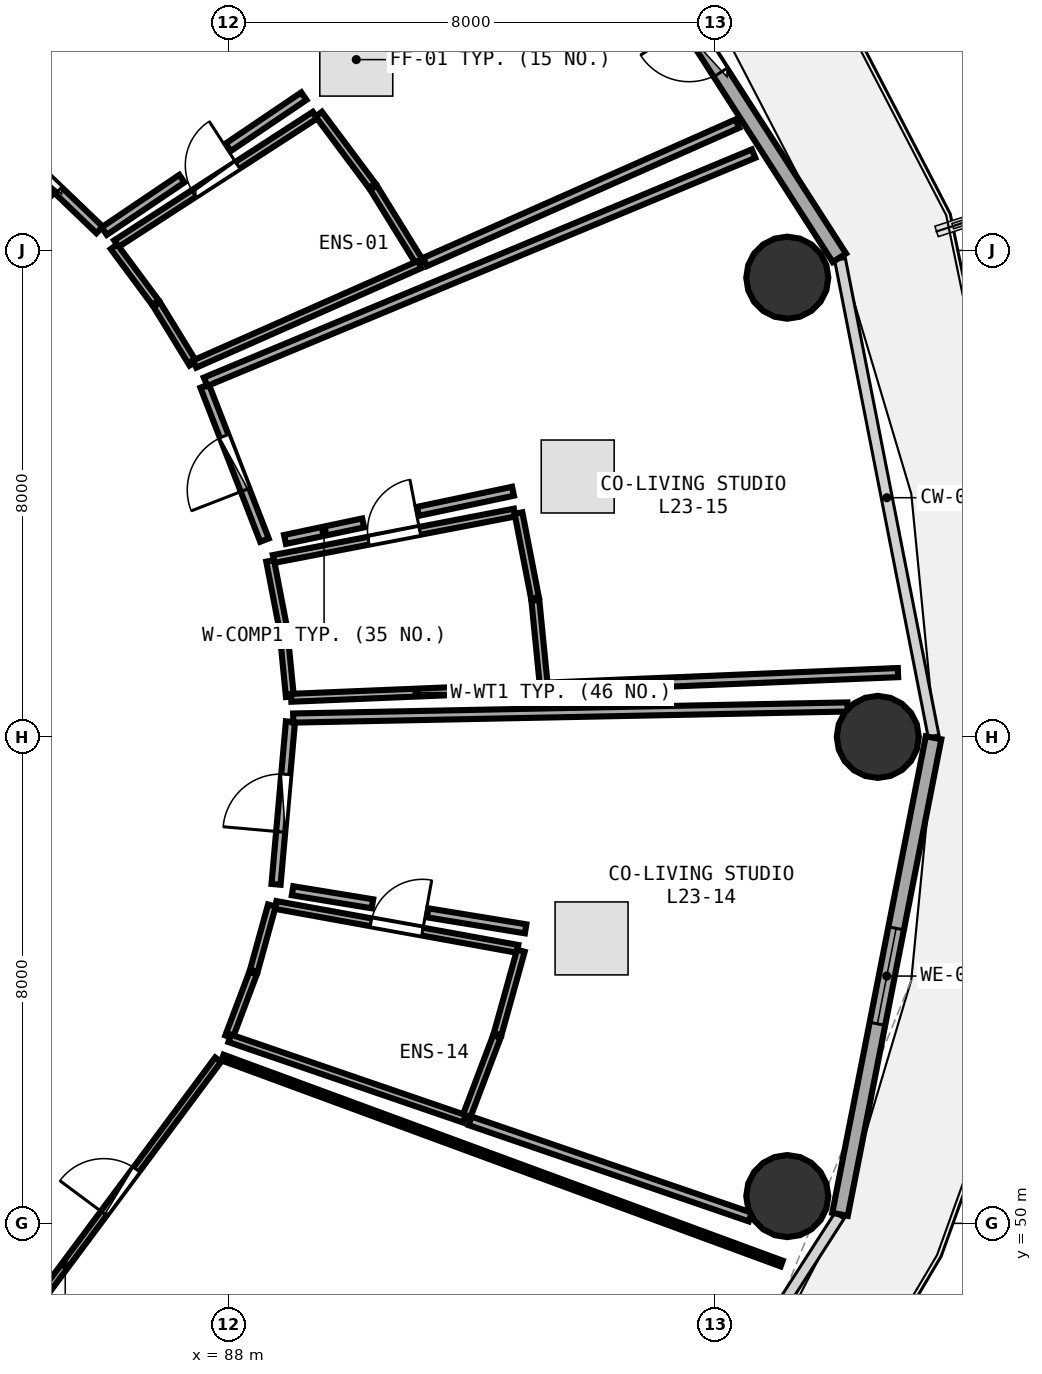
"""IFC4 building model, lengths in metres.
Left out: names, types, materials, properties, quantities, classifications, styles, units other than length and angle.
Written with IfcOpenShell. Run it as: python <this file> out.ifc"""

import sys

from ifc_helpers import new_model, si_unit, direction, frame, frame_2d, origin, origin_2d, place, context, subcontext, project, spatial, rectangle, circle, extrude, element, fill, save


model = new_model("IFC4")
c1 = context("Model", 3, precision=1e-05, world=origin(), true_north=direction((0.0, 1.0)))
c2 = subcontext(c1, "Body", "Model", "MODEL_VIEW")
j1 = project(units=[si_unit("LENGTHUNIT", "METRE"), si_unit("PLANEANGLEUNIT", "RADIAN")], contexts=[c1])
p1 = place(None, origin())
s1 = spatial("IfcSite", under=j1, at=p1, CompositionType="ELEMENT")
p2 = place(p1, origin())
s2 = spatial("IfcBuilding", under=s1, at=p2, CompositionType="ELEMENT")
p3 = place(p2, frame((0.0, 0.0, 91.35)))
s3 = spatial("IfcBuildingStorey", under=s2, at=p3, CompositionType="ELEMENT", Elevation=91.35)
for number, where, z_axis, x_axis in (
    (1, (98.68, 58.0, 0.0), (0.0, 0.0, 1.0), (1.0, 0.0, 0.0)),
    (2, (97.192, 65.552, 0.0), (0.0, 0.0, 1.0), (1.0, 0.0, 0.0)),
    (3, (97.192, 50.448, 0.0), (0.0, 0.0, 1.0), (1.0, 0.0, 0.0)),
):
    element("IfcColumn", number, at=place(p3, frame(where, z_axis=z_axis, x_axis=x_axis)), inside=s3, PredefinedType="COLUMN", context=c2, shape_type="SweptSolid", body=[
        extrude(circle(Radius=0.675, at=origin_2d()), origin(), (0.0, 0.0, 1.0), 3.75),
    ])
p4 = place(p3, frame((98.048, 65.879, 0.0), z_axis=(0.0, 0.0, 1.0), x_axis=(-0.540620528459, 0.841266571432, 0.0)))
e4 = element("IfcWall", 4, at=p4, inside=s3, PredefinedType="SOLIDWALL", context=c2, shape_type="SweptSolid", body=[
    extrude(rectangle(XDim=8.193, YDim=0.26, at=frame_2d((4.096, 0.0))), origin(), (0.0, 0.0, 1.0), 3.475),
])
p5 = place(p4, frame((3.621, 0.0, 0.0)))
e5 = element("IfcOpeningElement", 5, at=p5, cuts=e4, PredefinedType="OPENING", context=c2, shape_type="SweptSolid", body=[
    extrude(rectangle(XDim=0.95, YDim=2.1, at=frame_2d((0.475, 1.05))), frame((0.0, 0.14, 0.0), z_axis=(0.0, -1.0, 0.0), x_axis=(1.0, 0.0, 0.0)), (0.0, 0.0, 1.0), 0.28),
])
p6 = place(p4, frame((4.921, 0.0, 0.85)))
e6 = element("IfcOpeningElement", 6, at=p6, cuts=e4, PredefinedType="OPENING", context=c2, shape_type="SweptSolid", body=[
    extrude(rectangle(XDim=1.2, YDim=1.45, at=frame_2d((0.6, 0.725))), frame((0.0, 0.14, 0.0), z_axis=(0.0, -1.0, 0.0), x_axis=(1.0, 0.0, 0.0)), (0.0, 0.0, 1.0), 0.28),
])
p7 = place(p3, frame((98.059, 50.148, 0.0), z_axis=(0.0, 0.0, 1.0), x_axis=(0.192581843632, 0.981280914674, 0.0)))
e7 = element("IfcWall", 7, at=p7, inside=s3, PredefinedType="SOLIDWALL", context=c2, shape_type="SweptSolid", body=[
    extrude(rectangle(XDim=7.987, YDim=0.26, at=frame_2d((3.993, 0.0))), origin(), (0.0, 0.0, 1.0), 3.475),
])
p8 = place(p7, frame((3.193, 0.0, 0.85)))
e8 = element("IfcOpeningElement", 8, at=p8, cuts=e7, PredefinedType="OPENING", context=c2, shape_type="SweptSolid", body=[
    extrude(rectangle(XDim=1.6, YDim=1.45, at=frame_2d((0.8, 0.725))), frame((0.0, 0.14, 0.0), z_axis=(0.0, -1.0, 0.0), x_axis=(1.0, 0.0, 0.0)), (0.0, 0.0, 1.0), 0.28),
])
p9 = place(p3, frame((86.156, 66.111, 0.0), z_axis=(0.0, 0.0, 1.0), x_axis=(0.839597088747, 0.543209654339, 0.0)))
e9 = element("IfcWall", 9, at=p9, inside=s3, PredefinedType="PLUMBINGWALL", context=c2, shape_type="SweptSolid", body=[
    extrude(rectangle(XDim=3.891, YDim=0.13, at=frame_2d((1.946, 0.0))), origin(), (0.0, 0.0, 1.0), 3.175),
])
p10 = place(p9, frame((1.516, 0.0, 0.0)))
e10 = element("IfcOpeningElement", 10, at=p10, cuts=e9, PredefinedType="OPENING", context=c2, shape_type="SweptSolid", body=[
    extrude(rectangle(XDim=0.86, YDim=2.05, at=frame_2d((0.43, 1.025))), frame((0.0, 0.075, 0.0), z_axis=(0.0, -1.0, 0.0), x_axis=(1.0, 0.0, 0.0)), (0.0, 0.0, 1.0), 0.15),
])
p11 = place(p3, frame((85.882, 66.337, 0.0), z_axis=(0.0, 0.0, 1.0), x_axis=(-0.721698326825, 0.692207718144, 0.0)))
e11 = element("IfcWall", 11, at=p11, inside=s3, PredefinedType="PARTITIONING", context=c2, shape_type="SweptSolid", body=[
    extrude(rectangle(XDim=2.823, YDim=0.15, at=frame_2d((1.412, 0.0))), origin(), (0.0, 0.0, 1.0), 2.925),
])
p12 = place(p11, frame((0.936, 0.0, 0.0)))
e12 = element("IfcOpeningElement", 12, at=p12, cuts=e11, PredefinedType="OPENING", context=c2, shape_type="SweptSolid", body=[
    extrude(rectangle(XDim=0.95, YDim=2.08, at=frame_2d((0.475, 1.04))), frame((0.0, 0.085, 0.0), z_axis=(0.0, -1.0, 0.0), x_axis=(1.0, 0.0, 0.0)), (0.0, 0.0, 1.0), 0.17),
])
p13 = place(p3, frame((84.608, 48.36, 0.0), z_axis=(0.0, 0.0, 1.0), x_axis=(0.596833425992, 0.802365167251, 0.0)))
e13 = element("IfcWall", 13, at=p13, inside=s3, PredefinedType="PARTITIONING", context=c2, shape_type="SweptSolid", body=[
    extrude(rectangle(XDim=5.399, YDim=0.12, at=frame_2d((2.699, 0.0))), origin(), (0.0, 0.0, 1.0), 2.925),
])
p14 = place(p13, frame((2.249, 0.0, 0.0)))
e14 = element("IfcOpeningElement", 14, at=p14, cuts=e13, PredefinedType="OPENING", context=c2, shape_type="SweptSolid", body=[
    extrude(rectangle(XDim=0.9, YDim=2.08, at=frame_2d((0.45, 1.04))), frame((0.0, 0.07, 0.0), z_axis=(0.0, -1.0, 0.0), x_axis=(1.0, 0.0, 0.0)), (0.0, 0.0, 1.0), 0.14),
])
p15 = place(p3, frame((88.779, 55.235, 0.0), z_axis=(0.0, 0.0, 1.0), x_axis=(0.983931701878, -0.178545249279, 0.0)))
e15 = element("IfcWall", 15, at=p15, inside=s3, PredefinedType="PLUMBINGWALL", context=c2, shape_type="SweptSolid", body=[
    extrude(rectangle(XDim=4.042, YDim=0.13, at=frame_2d((2.021, 0.0))), origin(), (0.0, 0.0, 1.0), 3.175),
])
p16 = place(p15, frame((1.591, 0.0, 0.0)))
e16 = element("IfcOpeningElement", 16, at=p16, cuts=e15, PredefinedType="OPENING", context=c2, shape_type="SweptSolid", body=[
    extrude(rectangle(XDim=0.86, YDim=2.05, at=frame_2d((0.43, 1.025))), frame((0.0, 0.075, 0.0), z_axis=(0.0, -1.0, 0.0), x_axis=(1.0, 0.0, 0.0)), (0.0, 0.0, 1.0), 0.15),
])
p17 = place(p3, frame((88.783, 55.575, 0.0), z_axis=(0.0, 0.0, 1.0), x_axis=(0.088469625327, 0.996078875087, 0.0)))
e17 = element("IfcWall", 17, at=p17, inside=s3, PredefinedType="PARTITIONING", context=c2, shape_type="SweptSolid", body=[
    extrude(rectangle(XDim=2.685, YDim=0.15, at=frame_2d((1.343, 0.0))), origin(), (0.0, 0.0, 1.0), 2.925),
])
p18 = place(p17, frame((0.867, 0.0, 0.0)))
e18 = element("IfcOpeningElement", 18, at=p18, cuts=e17, PredefinedType="OPENING", context=c2, shape_type="SweptSolid", body=[
    extrude(rectangle(XDim=0.95, YDim=2.08, at=frame_2d((0.475, 1.04))), frame((0.0, 0.085, 0.0), z_axis=(0.0, -1.0, 0.0), x_axis=(1.0, 0.0, 0.0)), (0.0, 0.0, 1.0), 0.17),
])
p19 = place(p3, frame((88.742, 60.925, 0.0), z_axis=(0.0, 0.0, 1.0), x_axis=(0.981973232987, 0.189020024595, 0.0)))
e19 = element("IfcWall", 19, at=p19, inside=s3, PredefinedType="PLUMBINGWALL", context=c2, shape_type="SweptSolid", body=[
    extrude(rectangle(XDim=4.039, YDim=0.13, at=frame_2d((2.02, 0.0))), origin(), (0.0, 0.0, 1.0), 3.175),
])
p20 = place(p19, frame((1.59, 0.0, 0.0)))
e20 = element("IfcOpeningElement", 20, at=p20, cuts=e19, PredefinedType="OPENING", context=c2, shape_type="SweptSolid", body=[
    extrude(rectangle(XDim=0.86, YDim=2.05, at=frame_2d((0.43, 1.025))), frame((0.0, 0.075, 0.0), z_axis=(0.0, -1.0, 0.0), x_axis=(1.0, 0.0, 0.0)), (0.0, 0.0, 1.0), 0.15),
])
p21 = place(p3, frame((88.593, 61.236, 0.0), z_axis=(0.0, 0.0, 1.0), x_axis=(-0.361969309841, 0.93219001214, 0.0)))
e21 = element("IfcWall", 21, at=p21, inside=s3, PredefinedType="PARTITIONING", context=c2, shape_type="SweptSolid", body=[
    extrude(rectangle(XDim=2.718, YDim=0.15, at=frame_2d((1.359, 0.0))), origin(), (0.0, 0.0, 1.0), 3.235),
])
p22 = place(p21, frame((0.884, 0.0, 0.0)))
e22 = element("IfcOpeningElement", 22, at=p22, cuts=e21, PredefinedType="OPENING", context=c2, shape_type="SweptSolid", body=[
    extrude(rectangle(XDim=0.95, YDim=2.08, at=frame_2d((0.475, 1.04))), frame((0.0, 0.085, 0.0), z_axis=(0.0, -1.0, 0.0), x_axis=(1.0, 0.0, 0.0)), (0.0, 0.0, 1.0), 0.17),
])
p23 = place(p3, frame((87.417, 64.141, 0.0), z_axis=(0.0, 0.0, 1.0), x_axis=(-0.52310141153, 0.852270446077, 0.0)))
e23 = element("IfcWall", 23, at=p23, inside=s3, PredefinedType="PLUMBINGWALL", context=c2, shape_type="SweptSolid", body=[
    extrude(rectangle(XDim=1.135, YDim=0.13, at=frame_2d((0.568, 0.0))), origin(), (0.0, 0.0, 1.0), 2.925),
])
p24 = place(p3, frame((86.8, 65.142, 0.0), z_axis=(0.0, 0.0, 1.0), x_axis=(-0.595625136946, 0.803262532574, 0.0)))
e24 = element("IfcWall", 24, at=p24, inside=s3, PredefinedType="PLUMBINGWALL", context=c2, shape_type="SweptSolid", body=[
    extrude(rectangle(XDim=1.145, YDim=0.13, at=frame_2d((0.573, 0.0))), origin(), (0.0, 0.0, 1.0), 2.925),
])
p25 = place(p3, frame((89.486, 68.241, 0.0), z_axis=(0.0, 0.0, 1.0), x_axis=(0.598215175904, -0.801335512328, 0.0)))
e25 = element("IfcWall", 25, at=p25, inside=s3, PredefinedType="PLUMBINGWALL", context=c2, shape_type="SweptSolid", body=[
    extrude(rectangle(XDim=1.468, YDim=0.13, at=frame_2d((0.734, 0.0))), origin(), (0.0, 0.0, 1.0), 3.48),
])
p26 = place(p3, frame((90.386, 67.032, 0.0), z_axis=(0.0, 0.0, 1.0), x_axis=(0.525910281035, -0.850540049793, 0.0)))
e26 = element("IfcWall", 26, at=p26, inside=s3, PredefinedType="PLUMBINGWALL", context=c2, shape_type="SweptSolid", body=[
    extrude(rectangle(XDim=1.457, YDim=0.13, at=frame_2d((0.729, 0.0))), origin(), (0.0, 0.0, 1.0), 3.48),
])
p27 = place(p3, frame((91.145, 65.768, 0.0), z_axis=(0.0, 0.0, 1.0), x_axis=(-0.914586427441, -0.404390487946, 0.0)))
e27 = element("IfcWall", 27, at=p27, inside=s3, PredefinedType="PLUMBINGWALL", context=c2, shape_type="SweptSolid", body=[
    extrude(rectangle(XDim=4.045, YDim=0.13, at=frame_2d((2.022, 0.0))), origin(), (0.0, 0.0, 1.0), 2.925),
])
p28 = place(p3, frame((83.829, 68.362, 0.0), z_axis=(0.0, 0.0, 1.0), x_axis=(0.698749209364, 0.715366718833, 0.0)))
e28 = element("IfcWall", 28, at=p28, inside=s3, PredefinedType="PARTITIONING", context=c2, shape_type="SweptSolid", body=[
    extrude(rectangle(XDim=9.3, YDim=0.15, at=frame_2d((4.65, 0.0))), origin(), (0.0, 0.0, 1.0), 2.975),
])
p29 = place(p3, frame((96.369, 68.085, 0.0), z_axis=(0.0, 0.0, 1.0), x_axis=(-0.914319955381, -0.404992616219, 0.0)))
e29 = element("IfcWall", 29, at=p29, inside=s3, PredefinedType="PARTITIONING", context=c2, shape_type="SweptSolid", body=[
    extrude(rectangle(XDim=5.616, YDim=0.15, at=frame_2d((2.808, 0.0))), origin(), (0.0, 0.0, 1.0), 2.975),
])
p30 = place(p3, frame((89.241, 68.537, 0.0), z_axis=(0.0, 0.0, 1.0), x_axis=(-0.828582854192, -0.559866460631, 0.0)))
e30 = element("IfcWall", 30, at=p30, inside=s3, PredefinedType="PARTITIONING", context=c2, shape_type="SweptSolid", body=[
    extrude(rectangle(XDim=1.502, YDim=0.15, at=frame_2d((0.751, 0.0))), origin(), (0.0, 0.0, 1.0), 3.175),
])
p31 = place(p3, frame((87.234, 67.181, 0.0), z_axis=(0.0, 0.0, 1.0), x_axis=(-0.828521381114, -0.559957427879, 0.0)))
e31 = element("IfcWall", 31, at=p31, inside=s3, PredefinedType="PARTITIONING", context=c2, shape_type="SweptSolid", body=[
    extrude(rectangle(XDim=1.54, YDim=0.15, at=frame_2d((0.77, 0.0))), origin(), (0.0, 0.0, 1.0), 3.235),
])
p32 = place(p3, frame((86.154, 71.378, 0.0), z_axis=(0.0, 0.0, 1.0), x_axis=(-0.681137169266, -0.732155828116, 0.0)))
e32 = element("IfcWall", 32, at=p32, inside=s3, PredefinedType="PLUMBINGWALL", context=c2, shape_type="SweptSolid", body=[
    extrude(rectangle(XDim=3.847, YDim=0.13, at=frame_2d((1.924, 0.0))), origin(), (0.0, 0.0, 1.0), 3.175),
])
p33 = place(p3, frame((87.904, 52.726, 0.0), z_axis=(0.0, 0.0, 1.0), x_axis=(0.938361829853, -0.345654562063, 0.0)))
e33 = element("IfcWall", 33, at=p33, inside=s3, PredefinedType="PARTITIONING", context=c2, shape_type="SweptSolid", body=[
    extrude(rectangle(XDim=9.8, YDim=0.1, at=frame_2d((4.9, 0.0))), origin(), (0.0, 0.0, 1.0), 2.925),
])
p34 = place(p3, frame((88.01, 53.068, 0.0), z_axis=(0.0, 0.0, 1.0), x_axis=(0.353582849957, 0.93540321157, 0.0)))
e34 = element("IfcWall", 34, at=p34, inside=s3, PredefinedType="PLUMBINGWALL", context=c2, shape_type="SweptSolid", body=[
    extrude(rectangle(XDim=1.12, YDim=0.13, at=frame_2d((0.56, 0.0))), origin(), (0.0, 0.0, 1.0), 3.235),
])
p35 = place(p3, frame((88.418, 54.153, 0.0), z_axis=(0.0, 0.0, 1.0), x_axis=(0.266139738922, 0.963934458024, 0.0)))
e35 = element("IfcWall", 35, at=p35, inside=s3, PredefinedType="PLUMBINGWALL", context=c2, shape_type="SweptSolid", body=[
    extrude(rectangle(XDim=1.114, YDim=0.13, at=frame_2d((0.557, 0.0))), origin(), (0.0, 0.0, 1.0), 3.48),
])
p36 = place(p3, frame((92.81, 54.484, 0.0), z_axis=(0.0, 0.0, 1.0), x_axis=(-0.268041350083, -0.963407408445, 0.0)))
e36 = element("IfcWall", 36, at=p36, inside=s3, PredefinedType="PLUMBINGWALL", context=c2, shape_type="SweptSolid", body=[
    extrude(rectangle(XDim=1.426, YDim=0.13, at=frame_2d((0.713, 0.0))), origin(), (0.0, 0.0, 1.0), 3.48),
])
p37 = place(p3, frame((92.415, 53.072, 0.0), z_axis=(0.0, 0.0, 1.0), x_axis=(-0.354833873896, -0.934929367351, 0.0)))
e37 = element("IfcWall", 37, at=p37, inside=s3, PredefinedType="PLUMBINGWALL", context=c2, shape_type="SweptSolid", body=[
    extrude(rectangle(XDim=1.434, YDim=0.13, at=frame_2d((0.717, 0.0))), origin(), (0.0, 0.0, 1.0), 3.48),
])
p38 = place(p3, frame((91.88, 51.719, 0.0), z_axis=(0.0, 0.0, 1.0), x_axis=(-0.945930729077, 0.324368703466, 0.0)))
e38 = element("IfcWall", 38, at=p38, inside=s3, PredefinedType="PLUMBINGWALL", context=c2, shape_type="SweptSolid", body=[
    extrude(rectangle(XDim=4.079, YDim=0.13, at=frame_2d((2.039, 0.0))), origin(), (0.0, 0.0, 1.0), 3.175),
])
p39 = place(p3, frame((89.066, 58.31, 0.0), z_axis=(0.0, 0.0, 1.0), x_axis=(0.999799952906, 0.020001354173, 0.0)))
e39 = element("IfcWall", 39, at=p39, inside=s3, PredefinedType="PARTITIONING", context=c2, shape_type="SweptSolid", body=[
    extrude(rectangle(XDim=9.118, YDim=0.15, at=frame_2d((4.559, 0.0))), origin(), (0.0, 0.0, 1.0), 3.175),
])
p40 = place(p3, frame((96.583, 50.104, 0.0), z_axis=(0.0, 0.0, 1.0), x_axis=(-0.945793886269, 0.324767493288, 0.0)))
e40 = element("IfcWall", 40, at=p40, inside=s3, PredefinedType="PARTITIONING", context=c2, shape_type="SweptSolid", body=[
    extrude(rectangle(XDim=4.873, YDim=0.15, at=frame_2d((2.437, 0.0))), origin(), (0.0, 0.0, 1.0), 2.925),
])
p41 = place(p3, frame((92.888, 54.844, 0.0), z_axis=(0.0, 0.0, 1.0), x_axis=(-0.986922201966, 0.161197292988, 0.0)))
e41 = element("IfcWall", 41, at=p41, inside=s3, PredefinedType="PARTITIONING", context=c2, shape_type="SweptSolid", body=[
    extrude(rectangle(XDim=1.633, YDim=0.15, at=frame_2d((0.816, 0.0))), origin(), (0.0, 0.0, 1.0), 3.175),
])
p42 = place(p3, frame((90.369, 55.255, 0.0), z_axis=(0.0, 0.0, 1.0), x_axis=(-0.986928715278, 0.161157410501, 0.0)))
e42 = element("IfcWall", 42, at=p42, inside=s3, PredefinedType="PARTITIONING", context=c2, shape_type="SweptSolid", body=[
    extrude(rectangle(XDim=1.332, YDim=0.15, at=frame_2d((0.666, 0.0))), origin(), (0.0, 0.0, 1.0), 3.48),
])
p43 = place(p3, frame((89.011, 58.662, 0.0), z_axis=(0.0, 0.0, 1.0), x_axis=(-0.097430149617, 0.995242365429, 0.0)))
e43 = element("IfcWall", 43, at=p43, inside=s3, PredefinedType="PLUMBINGWALL", context=c2, shape_type="SweptSolid", body=[
    extrude(rectangle(XDim=1.108, YDim=0.13, at=frame_2d((0.554, 0.0))), origin(), (0.0, 0.0, 1.0), 3.48),
])
p44 = place(p3, frame((88.897, 59.804, 0.0), z_axis=(0.0, 0.0, 1.0), x_axis=(-0.18947511119, 0.981885523999, 0.0)))
e44 = element("IfcWall", 44, at=p44, inside=s3, PredefinedType="PLUMBINGWALL", context=c2, shape_type="SweptSolid", body=[
    extrude(rectangle(XDim=1.111, YDim=0.13, at=frame_2d((0.555, 0.0))), origin(), (0.0, 0.0, 1.0), 3.48),
])
p45 = place(p3, frame((92.771, 61.68, 0.0), z_axis=(0.0, 0.0, 1.0), x_axis=(0.191058204905, -0.981578709192, 0.0)))
e45 = element("IfcWall", 45, at=p45, inside=s3, PredefinedType="PLUMBINGWALL", context=c2, shape_type="SweptSolid", body=[
    extrude(rectangle(XDim=1.421, YDim=0.13, at=frame_2d((0.71, 0.0))), origin(), (0.0, 0.0, 1.0), 3.48),
])
p46 = place(p3, frame((93.048, 60.246, 0.0), z_axis=(0.0, 0.0, 1.0), x_axis=(0.098651373381, -0.995122056097, 0.0)))
e46 = element("IfcWall", 46, at=p46, inside=s3, PredefinedType="PLUMBINGWALL", context=c2, shape_type="SweptSolid", body=[
    extrude(rectangle(XDim=1.418, YDim=0.13, at=frame_2d((0.709, 0.0))), origin(), (0.0, 0.0, 1.0), 3.48),
])
p47 = place(p3, frame((93.17, 58.814, 0.0), z_axis=(0.0, 0.0, 1.0), x_axis=(-0.999142957242, -0.041392644201, 0.0)))
e47 = element("IfcWall", 47, at=p47, inside=s3, PredefinedType="PLUMBINGWALL", context=c2, shape_type="SweptSolid", body=[
    extrude(rectangle(XDim=4.141, YDim=0.13, at=frame_2d((2.07, 0.0))), origin(), (0.0, 0.0, 1.0), 3.175),
])
p48 = place(p3, frame((87.625, 63.84, 0.0), z_axis=(0.0, 0.0, 1.0), x_axis=(0.92321744991, 0.384277946521, 0.0)))
e48 = element("IfcWall", 48, at=p48, inside=s3, PredefinedType="PARTITIONING", context=c2, shape_type="SweptSolid", body=[
    extrude(rectangle(XDim=9.762, YDim=0.15, at=frame_2d((4.881, 0.0))), origin(), (0.0, 0.0, 1.0), 2.925),
])
p49 = place(p3, frame((99.012, 59.057, 0.0), z_axis=(0.0, 0.0, 1.0), x_axis=(-0.999136530054, -0.041547494638, 0.0)))
e49 = element("IfcWall", 49, at=p49, inside=s3, PredefinedType="PARTITIONING", context=c2, shape_type="SweptSolid", body=[
    extrude(rectangle(XDim=5.747, YDim=0.15, at=frame_2d((2.874, 0.0))), origin(), (0.0, 0.0, 1.0), 2.975),
])
p50 = place(p3, frame((92.681, 62.04, 0.0), z_axis=(0.0, 0.0, 1.0), x_axis=(-0.978359809994, -0.206910807327, 0.0)))
e50 = element("IfcWall", 50, at=p50, inside=s3, PredefinedType="PARTITIONING", context=c2, shape_type="SweptSolid", body=[
    extrude(rectangle(XDim=1.599, YDim=0.15, at=frame_2d((0.799, 0.0))), origin(), (0.0, 0.0, 1.0), 3.175),
])
p51 = place(p3, frame((90.216, 61.519, 0.0), z_axis=(0.0, 0.0, 1.0), x_axis=(-0.978356212177, -0.206927818562, 0.0)))
e51 = element("IfcWall", 51, at=p51, inside=s3, PredefinedType="PARTITIONING", context=c2, shape_type="SweptSolid", body=[
    extrude(rectangle(XDim=1.314, YDim=0.15, at=frame_2d((0.657, 0.0))), origin(), (0.0, 0.0, 1.0), 3.48),
])
p52 = place(p5, frame((0.95, 0.0, 0.0), z_axis=(0.0, 0.0, 1.0), x_axis=(-1.0, 0.0, 0.0)))
e52 = element("IfcDoor", 52, at=p52, inside=s3, OperationType="SINGLE_SWING_LEFT", PredefinedType="DOOR", context=c2, shape_type="SweptSolid", body=[
    extrude(rectangle(XDim=0.95, YDim=2.1, at=frame_2d((0.475, 1.05))), frame((0.0, 0.025, 0.0), z_axis=(0.0, -1.0, 0.0), x_axis=(1.0, 0.0, 0.0)), (0.0, 0.0, 1.0), 0.05),
])
fill(e5, e52)
p53 = place(p8, origin())
e53 = element("IfcWindow", 53, at=p53, inside=s3, PartitioningType="SINGLE_PANEL", PredefinedType="WINDOW", context=c2, shape_type="SweptSolid", body=[
    extrude(rectangle(XDim=1.6, YDim=1.45, at=frame_2d((0.8, 0.725))), frame((0.0, 0.03, 0.0), z_axis=(0.0, -1.0, 0.0), x_axis=(1.0, 0.0, 0.0)), (0.0, 0.0, 1.0), 0.06),
])
fill(e8, e53)
p54 = place(p10, origin())
e54 = element("IfcDoor", 54, at=p54, inside=s3, OperationType="SINGLE_SWING_RIGHT", PredefinedType="DOOR", context=c2, shape_type="SweptSolid", body=[
    extrude(rectangle(XDim=0.86, YDim=2.05, at=frame_2d((0.43, 1.025))), frame((0.0, 0.025, 0.0), z_axis=(0.0, -1.0, 0.0), x_axis=(1.0, 0.0, 0.0)), (0.0, 0.0, 1.0), 0.05),
])
fill(e10, e54)
p55 = place(p12, origin())
e55 = element("IfcDoor", 55, at=p55, inside=s3, OperationType="SINGLE_SWING_LEFT", PredefinedType="DOOR", context=c2, shape_type="SweptSolid", body=[
    extrude(rectangle(XDim=0.95, YDim=2.08, at=frame_2d((0.475, 1.04))), frame((0.0, 0.025, 0.0), z_axis=(0.0, -1.0, 0.0), x_axis=(1.0, 0.0, 0.0)), (0.0, 0.0, 1.0), 0.05),
])
fill(e12, e55)
p56 = place(p14, origin())
e56 = element("IfcDoor", 56, at=p56, inside=s3, OperationType="SINGLE_SWING_LEFT", PredefinedType="DOOR", context=c2, shape_type="SweptSolid", body=[
    extrude(rectangle(XDim=0.9, YDim=2.08, at=frame_2d((0.45, 1.04))), frame((0.0, 0.025, 0.0), z_axis=(0.0, -1.0, 0.0), x_axis=(1.0, 0.0, 0.0)), (0.0, 0.0, 1.0), 0.05),
])
fill(e14, e56)
p57 = place(p16, origin())
e57 = element("IfcDoor", 57, at=p57, inside=s3, OperationType="SINGLE_SWING_RIGHT", PredefinedType="DOOR", context=c2, shape_type="SweptSolid", body=[
    extrude(rectangle(XDim=0.86, YDim=2.05, at=frame_2d((0.43, 1.025))), frame((0.0, 0.025, 0.0), z_axis=(0.0, -1.0, 0.0), x_axis=(1.0, 0.0, 0.0)), (0.0, 0.0, 1.0), 0.05),
])
fill(e16, e57)
p58 = place(p18, origin())
e58 = element("IfcDoor", 58, at=p58, inside=s3, OperationType="SINGLE_SWING_LEFT", PredefinedType="DOOR", context=c2, shape_type="SweptSolid", body=[
    extrude(rectangle(XDim=0.95, YDim=2.08, at=frame_2d((0.475, 1.04))), frame((0.0, 0.025, 0.0), z_axis=(0.0, -1.0, 0.0), x_axis=(1.0, 0.0, 0.0)), (0.0, 0.0, 1.0), 0.05),
])
fill(e18, e58)
p59 = place(p20, origin())
e59 = element("IfcDoor", 59, at=p59, inside=s3, OperationType="SINGLE_SWING_RIGHT", PredefinedType="DOOR", context=c2, shape_type="SweptSolid", body=[
    extrude(rectangle(XDim=0.86, YDim=2.05, at=frame_2d((0.43, 1.025))), frame((0.0, 0.025, 0.0), z_axis=(0.0, -1.0, 0.0), x_axis=(1.0, 0.0, 0.0)), (0.0, 0.0, 1.0), 0.05),
])
fill(e20, e59)
p60 = place(p22, origin())
e60 = element("IfcDoor", 60, at=p60, inside=s3, OperationType="SINGLE_SWING_LEFT", PredefinedType="DOOR", context=c2, shape_type="SweptSolid", body=[
    extrude(rectangle(XDim=0.95, YDim=2.08, at=frame_2d((0.475, 1.04))), frame((0.0, 0.025, 0.0), z_axis=(0.0, -1.0, 0.0), x_axis=(1.0, 0.0, 0.0)), (0.0, 0.0, 1.0), 0.05),
])
fill(e22, e60)
save(model, sys.argv[1])
